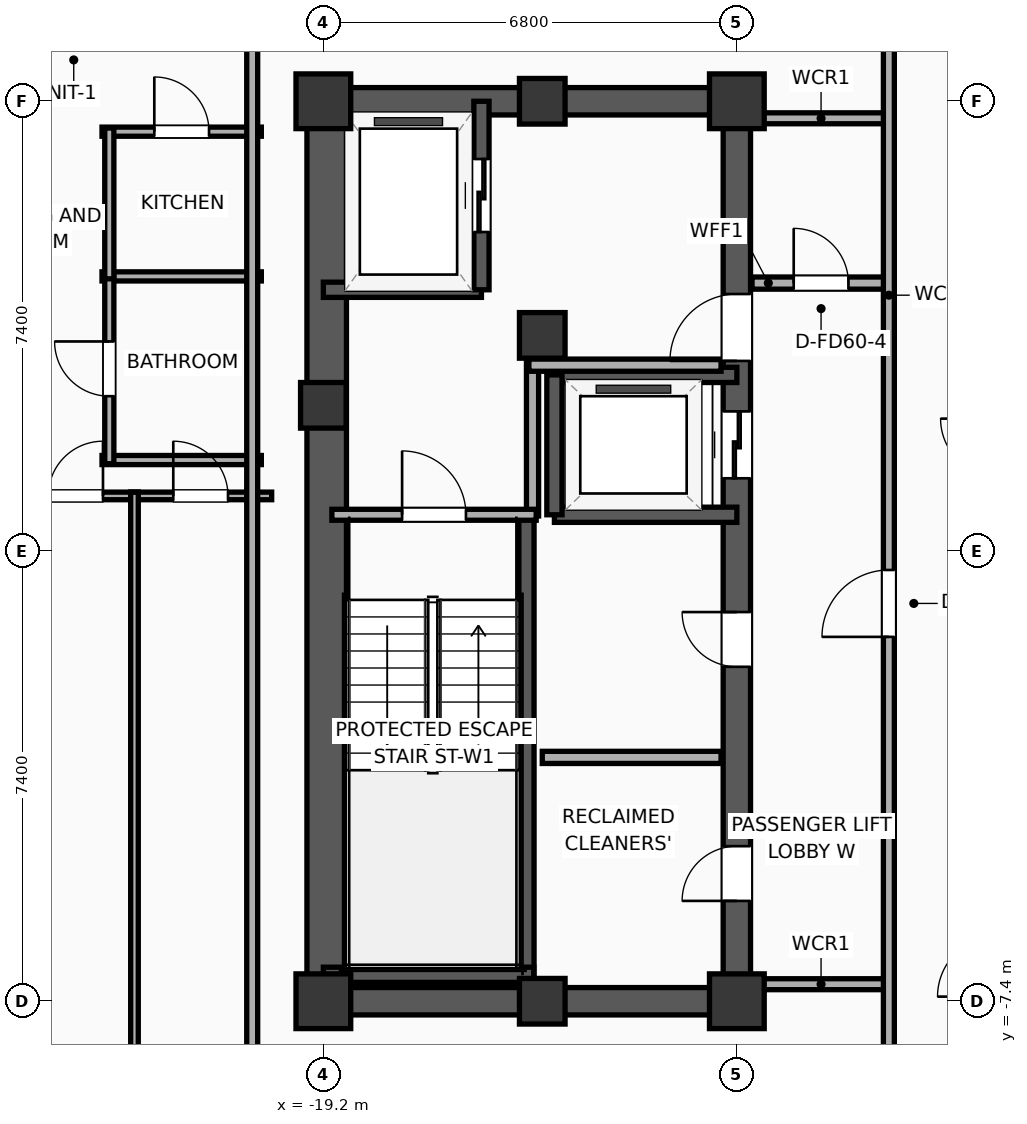
"""IFC4 building model, lengths in metres.
Left out: names, types, materials, properties, quantities, classifications, styles, units other than length and angle.
Written with IfcOpenShell. Run it as: python <this file> out.ifc"""

import sys

from ifc_helpers import new_model, si_unit, direction, frame, frame_2d, origin, origin_2d, place, context, subcontext, project, spatial, rectangle, extrude, element, fill, save


model = new_model("IFC4")
c1 = context("Model", 3, precision=1e-05, world=origin(), true_north=direction((0.0, 1.0)))
c2 = subcontext(c1, "Body", "Model", "MODEL_VIEW")
j1 = project(units=[si_unit("LENGTHUNIT", "METRE"), si_unit("PLANEANGLEUNIT", "RADIAN")], contexts=[c1])
p1 = place(None, origin())
s1 = spatial("IfcSite", under=j1, at=p1, CompositionType="ELEMENT")
p2 = place(p1, origin())
s2 = spatial("IfcBuilding", under=s1, at=p2, CompositionType="ELEMENT")
p3 = place(p2, frame((0.0, 0.0, 235.3)))
s3 = spatial("IfcBuildingStorey", under=s2, at=p3, CompositionType="ELEMENT", Elevation=235.3)
p4 = place(p3, frame((-19.2, -7.4, 0.0), z_axis=(0.0, 0.0, 1.0), x_axis=(1.0, 0.0, 0.0)))
e1 = element("IfcColumn", 1, at=p4, inside=s3, PredefinedType="COLUMN", context=c2, shape_type="SweptSolid", body=[
    extrude(rectangle(XDim=0.9, YDim=0.9, at=origin_2d()), origin(), (0.0, 0.0, 1.0), 3.9),
])
p5 = place(p3, frame((-19.2, 2.4, 0.0), z_axis=(0.0, 0.0, 1.0), x_axis=(1.0, 0.0, 0.0)))
e2 = element("IfcColumn", 2, at=p5, inside=s3, PredefinedType="COLUMN", context=c2, shape_type="SweptSolid", body=[
    extrude(rectangle(XDim=0.75, YDim=0.75, at=origin_2d()), origin(), (0.0, 0.0, 1.0), 3.9),
])
p6 = place(p3, frame((-19.2, 7.4, 0.0), z_axis=(0.0, 0.0, 1.0), x_axis=(1.0, 0.0, 0.0)))
e3 = element("IfcColumn", 3, at=p6, inside=s3, PredefinedType="COLUMN", context=c2, shape_type="SweptSolid", body=[
    extrude(rectangle(XDim=0.9, YDim=0.9, at=origin_2d()), origin(), (0.0, 0.0, 1.0), 3.9),
])
for number, where, z_axis, x_axis in (
    (4, (-15.6, -7.4, 0.0), (0.0, 0.0, 1.0), (1.0, 0.0, 0.0)),
    (5, (-15.6, 7.4, 0.0), (0.0, 0.0, 1.0), (1.0, 0.0, 0.0)),
):
    element("IfcColumn", number, at=place(p3, frame(where, z_axis=z_axis, x_axis=x_axis)), inside=s3, PredefinedType="COLUMN", context=c2, shape_type="SweptSolid", body=[
        extrude(rectangle(XDim=0.75, YDim=0.75, at=origin_2d()), origin(), (0.0, 0.0, 1.0), 3.9),
    ])
p7 = place(p3, frame((-12.4, -7.4, 0.0), z_axis=(0.0, 0.0, 1.0), x_axis=(1.0, 0.0, 0.0)))
e6 = element("IfcColumn", 6, at=p7, inside=s3, PredefinedType="COLUMN", context=c2, shape_type="SweptSolid", body=[
    extrude(rectangle(XDim=0.9, YDim=0.9, at=origin_2d()), origin(), (0.0, 0.0, 1.0), 3.9),
])
p8 = place(p3, frame((-15.6, 3.55, 0.0), z_axis=(0.0, 0.0, 1.0), x_axis=(1.0, 0.0, 0.0)))
e7 = element("IfcColumn", 7, at=p8, inside=s3, PredefinedType="COLUMN", context=c2, shape_type="SweptSolid", body=[
    extrude(rectangle(XDim=0.75, YDim=0.75, at=origin_2d()), origin(), (0.0, 0.0, 1.0), 3.9),
])
p9 = place(p3, frame((-12.4, 7.4, 0.0), z_axis=(0.0, 0.0, 1.0), x_axis=(1.0, 0.0, 0.0)))
e8 = element("IfcColumn", 8, at=p9, inside=s3, PredefinedType="COLUMN", context=c2, shape_type="SweptSolid", body=[
    extrude(rectangle(XDim=0.9, YDim=0.9, at=origin_2d()), origin(), (0.0, 0.0, 1.0), 3.9),
])
for number, where, z_axis, x_axis in (
    (9, (-19.425, -7.4, 0.0), (0.0, 0.0, 1.0), (1.0, 0.0, 0.0)),
    (10, (-19.425, 7.4, 0.0), (0.0, 0.0, 1.0), (1.0, 0.0, 0.0)),
):
    element("IfcWall", number, at=place(p3, frame(where, z_axis=z_axis, x_axis=x_axis)), inside=s3, PredefinedType="SHEAR", context=c2, shape_type="SweptSolid", body=[
        extrude(rectangle(XDim=7.25, YDim=0.45, at=frame_2d((3.625, 0.0))), origin(), (0.0, 0.0, 1.0), 3.65),
    ])
p10 = place(p3, frame((-19.145, -7.4, 0.0), z_axis=(0.0, 0.0, 1.0), x_axis=(0.0, 1.0, 0.0)))
e11 = element("IfcWall", 11, at=p10, inside=s3, PredefinedType="SHEAR", context=c2, shape_type="SweptSolid", body=[
    extrude(rectangle(XDim=14.8, YDim=0.65, at=frame_2d((7.4, 0.0))), origin(), (0.0, 0.0, 1.0), 3.65),
])
p11 = place(p3, frame((-12.4, -7.4, 0.0), z_axis=(0.0, 0.0, 1.0), x_axis=(0.0, 1.0, 0.0)))
e12 = element("IfcWall", 12, at=p11, inside=s3, PredefinedType="SHEAR", context=c2, shape_type="SweptSolid", body=[
    extrude(rectangle(XDim=14.8, YDim=0.45, at=frame_2d((7.4, 0.0))), origin(), (0.0, 0.0, 1.0), 3.65),
])
p12 = place(p11, frame((8.6, 0.0, 0.0)))
e13 = element("IfcOpeningElement", 13, at=p12, cuts=e12, PredefinedType="OPENING", context=c2, shape_type="SweptSolid", body=[
    extrude(rectangle(XDim=1.1, YDim=2.05, at=frame_2d((0.55, 1.025))), frame((0.0, 0.235, 0.0), z_axis=(0.0, -1.0, 0.0), x_axis=(1.0, 0.0, 0.0)), (0.0, 0.0, 1.0), 0.47),
])
p13 = place(p11, frame((10.53, 0.0, 0.0)))
e14 = element("IfcOpeningElement", 14, at=p13, cuts=e12, PredefinedType="OPENING", context=c2, shape_type="SweptSolid", body=[
    extrude(rectangle(XDim=1.1, YDim=2.05, at=frame_2d((0.55, 1.025))), frame((0.0, 0.235, 0.0), z_axis=(0.0, -1.0, 0.0), x_axis=(1.0, 0.0, 0.0)), (0.0, 0.0, 1.0), 0.47),
])
p14 = place(p11, frame((1.65, 0.0, 0.0)))
e15 = element("IfcOpeningElement", 15, at=p14, cuts=e12, PredefinedType="OPENING", context=c2, shape_type="SweptSolid", body=[
    extrude(rectangle(XDim=0.9, YDim=2.05, at=frame_2d((0.45, 1.025))), frame((0.0, 0.235, 0.0), z_axis=(0.0, -1.0, 0.0), x_axis=(1.0, 0.0, 0.0)), (0.0, 0.0, 1.0), 0.47),
])
p15 = place(p11, frame((5.5, 0.0, 0.0)))
e16 = element("IfcOpeningElement", 16, at=p15, cuts=e12, PredefinedType="OPENING", context=c2, shape_type="SweptSolid", body=[
    extrude(rectangle(XDim=0.9, YDim=2.05, at=frame_2d((0.45, 1.025))), frame((0.0, 0.235, 0.0), z_axis=(0.0, -1.0, 0.0), x_axis=(1.0, 0.0, 0.0)), (0.0, 0.0, 1.0), 0.47),
])
p16 = place(p3, frame((-15.86, -7.085, 0.0), z_axis=(0.0, 0.0, 1.0), x_axis=(0.0, 1.0, 0.0)))
e17 = element("IfcWall", 17, at=p16, inside=s3, PredefinedType="SOLIDWALL", context=c2, shape_type="SweptSolid", body=[
    extrude(rectangle(XDim=7.685, YDim=0.25, at=frame_2d((3.843, 0.0))), origin(), (0.0, 0.0, 1.0), 3.65),
])
p17 = place(p3, frame((-19.2, -6.965, 0.0), z_axis=(0.0, 0.0, 1.0), x_axis=(1.0, 0.0, 0.0)))
e18 = element("IfcWall", 18, at=p17, inside=s3, PredefinedType="SOLIDWALL", context=c2, shape_type="SweptSolid", body=[
    extrude(rectangle(XDim=3.46, YDim=0.25, at=frame_2d((1.73, 0.0))), origin(), (0.0, 0.0, 1.0), 3.65),
])
p18 = place(p3, frame((-19.2, 4.3, 0.0), z_axis=(0.0, 0.0, 1.0), x_axis=(1.0, 0.0, 0.0)))
e19 = element("IfcWall", 19, at=p18, inside=s3, PredefinedType="SOLIDWALL", context=c2, shape_type="SweptSolid", body=[
    extrude(rectangle(XDim=2.6, YDim=0.25, at=frame_2d((1.3, 0.0))), origin(), (0.0, 0.0, 1.0), 3.65),
])
p19 = place(p3, frame((-16.6, 4.3, 0.0), z_axis=(0.0, 0.0, 1.0), x_axis=(0.0, 1.0, 0.0)))
e20 = element("IfcWall", 20, at=p19, inside=s3, PredefinedType="SOLIDWALL", context=c2, shape_type="SweptSolid", body=[
    extrude(rectangle(XDim=3.1, YDim=0.25, at=frame_2d((1.55, 0.0))), origin(), (0.0, 0.0, 1.0), 3.65),
])
p20 = place(p19, frame((0.95, 0.0, 0.0)))
e21 = element("IfcOpeningElement", 21, at=p20, cuts=e20, PredefinedType="OPENING", context=c2, shape_type="SweptSolid", body=[
    extrude(rectangle(XDim=1.2, YDim=2.05, at=frame_2d((0.6, 1.025))), frame((0.0, 0.135, 0.0), z_axis=(0.0, -1.0, 0.0), x_axis=(1.0, 0.0, 0.0)), (0.0, 0.0, 1.0), 0.27),
])
for number, where, z_axis, x_axis in (
    (22, (-15.4, 0.6, 0.0), (0.0, 0.0, 1.0), (1.0, 0.0, 0.0)),
    (23, (-12.4, 2.9, 0.0), (0.0, 0.0, 1.0), (-1.0, 0.0, 0.0)),
):
    element("IfcWall", number, at=place(p3, frame(where, z_axis=z_axis, x_axis=x_axis)), inside=s3, PredefinedType="SOLIDWALL", context=c2, shape_type="SweptSolid", body=[
        extrude(rectangle(XDim=3.0, YDim=0.25, at=frame_2d((1.5, 0.0))), origin(), (0.0, 0.0, 1.0), 3.65),
    ])
p21 = place(p3, frame((-15.4, 2.9, 0.0), z_axis=(0.0, 0.0, 1.0), x_axis=(0.0, -1.0, 0.0)))
e24 = element("IfcWall", 24, at=p21, inside=s3, PredefinedType="SOLIDWALL", context=c2, shape_type="SweptSolid", body=[
    extrude(rectangle(XDim=2.3, YDim=0.25, at=frame_2d((1.15, 0.0))), origin(), (0.0, 0.0, 1.0), 3.65),
])
p22 = place(p3, frame((-15.76, 0.58, 0.0), z_axis=(0.0, 0.0, 1.0), x_axis=(0.0, 1.0, 0.0)))
e25 = element("IfcWall", 25, at=p22, inside=s3, PredefinedType="PARTITIONING", context=c2, shape_type="SweptSolid", body=[
    extrude(rectangle(XDim=2.52, YDim=0.2, at=frame_2d((1.26, 0.0))), origin(), (0.0, 0.0, 1.0), 3.65),
])
p23 = place(p3, frame((-15.82, 3.06, 0.0), z_axis=(0.0, 0.0, 1.0), x_axis=(1.0, 0.0, 0.0)))
e26 = element("IfcWall", 26, at=p23, inside=s3, PredefinedType="PARTITIONING", context=c2, shape_type="SweptSolid", body=[
    extrude(rectangle(XDim=3.16, YDim=0.2, at=frame_2d((1.58, 0.0))), origin(), (0.0, 0.0, 1.0), 3.65),
])
p24 = place(p3, frame((-19.06, 0.6, 0.0), z_axis=(0.0, 0.0, 1.0), x_axis=(1.0, 0.0, 0.0)))
e27 = element("IfcWall", 27, at=p24, inside=s3, PredefinedType="PARTITIONING", context=c2, shape_type="SweptSolid", body=[
    extrude(rectangle(XDim=3.36, YDim=0.18, at=frame_2d((1.68, 0.0))), origin(), (0.0, 0.0, 1.0), 3.65),
])
p25 = place(p24, frame((1.155, 0.0, 0.0)))
e28 = element("IfcOpeningElement", 28, at=p25, cuts=e27, PredefinedType="OPENING", context=c2, shape_type="SweptSolid", body=[
    extrude(rectangle(XDim=1.05, YDim=2.05, at=frame_2d((0.525, 1.025))), frame((0.0, 0.1, 0.0), z_axis=(0.0, -1.0, 0.0), x_axis=(1.0, 0.0, 0.0)), (0.0, 0.0, 1.0), 0.2),
])
p26 = place(p3, frame((-15.6, -3.39, 0.0), z_axis=(0.0, 0.0, 1.0), x_axis=(1.0, 0.0, 0.0)))
e29 = element("IfcWall", 29, at=p26, inside=s3, PredefinedType="PARTITIONING", context=c2, shape_type="SweptSolid", body=[
    extrude(rectangle(XDim=2.94, YDim=0.2, at=frame_2d((1.47, 0.0))), origin(), (0.0, 0.0, 1.0), 3.65),
])
p27 = place(p3, frame((-12.15, 4.41, 0.0), z_axis=(0.0, 0.0, 1.0), x_axis=(1.0, 0.0, 0.0)))
e30 = element("IfcWall", 30, at=p27, inside=s3, PredefinedType="PARTITIONING", context=c2, shape_type="SweptSolid", body=[
    extrude(rectangle(XDim=2.27, YDim=0.2, at=frame_2d((1.135, 0.0))), origin(), (0.0, 0.0, 1.0), 3.65),
])
p28 = place(p27, frame((0.685, 0.0, 0.0)))
e31 = element("IfcOpeningElement", 31, at=p28, cuts=e30, PredefinedType="OPENING", context=c2, shape_type="SweptSolid", body=[
    extrude(rectangle(XDim=0.9, YDim=2.05, at=frame_2d((0.45, 1.025))), frame((0.0, 0.11, 0.0), z_axis=(0.0, -1.0, 0.0), x_axis=(1.0, 0.0, 0.0)), (0.0, 0.0, 1.0), 0.22),
])
for number, where, z_axis, x_axis in (
    (32, (-12.15, 7.12, 0.0), (0.0, 0.0, 1.0), (1.0, 0.0, 0.0)),
    (33, (-12.15, -7.12, 0.0), (0.0, 0.0, 1.0), (1.0, 0.0, 0.0)),
):
    element("IfcWall", number, at=place(p3, frame(where, z_axis=z_axis, x_axis=x_axis)), inside=s3, PredefinedType="PARTITIONING", context=c2, shape_type="SweptSolid", body=[
        extrude(rectangle(XDim=2.27, YDim=0.18, at=frame_2d((1.135, 0.0))), origin(), (0.0, 0.0, 1.0), 3.65),
    ])
p29 = place(p3, frame((-9.9, -8.58, 0.0), z_axis=(0.0, 0.0, 1.0), x_axis=(0.0, 1.0, 0.0)))
e34 = element("IfcWall", 34, at=p29, inside=s3, PredefinedType="PARTITIONING", context=c2, shape_type="SweptSolid", body=[
    extrude(rectangle(XDim=17.16, YDim=0.18, at=frame_2d((8.58, 0.0))), origin(), (0.0, 0.0, 1.0), 3.65),
])
p30 = place(p29, frame((7.172, 0.0, 0.0)))
e35 = element("IfcOpeningElement", 35, at=p30, cuts=e34, PredefinedType="OPENING", context=c2, shape_type="SweptSolid", body=[
    extrude(rectangle(XDim=1.1, YDim=2.05, at=frame_2d((0.55, 1.025))), frame((0.0, 0.1, 0.0), z_axis=(0.0, -1.0, 0.0), x_axis=(1.0, 0.0, 0.0)), (0.0, 0.0, 1.0), 0.2),
])
p31 = place(p3, frame((-22.84, 6.9, 0.0), z_axis=(0.0, 0.0, 1.0), x_axis=(1.0, 0.0, 0.0)))
e36 = element("IfcWall", 36, at=p31, inside=s3, PredefinedType="PLUMBINGWALL", context=c2, shape_type="SweptSolid", body=[
    extrude(rectangle(XDim=2.62, YDim=0.15, at=frame_2d((1.31, 0.0))), origin(), (0.0, 0.0, 1.0), 3.65),
])
p32 = place(p31, frame((0.86, 0.0, 0.0)))
e37 = element("IfcOpeningElement", 37, at=p32, cuts=e36, PredefinedType="OPENING", context=c2, shape_type="SweptSolid", body=[
    extrude(rectangle(XDim=0.9, YDim=2.05, at=frame_2d((0.45, 1.025))), frame((0.0, 0.085, 0.0), z_axis=(0.0, -1.0, 0.0), x_axis=(1.0, 0.0, 0.0)), (0.0, 0.0, 1.0), 0.17),
])
for number, where, z_axis, x_axis in (
    (38, (-22.84, 4.52, 0.0), (0.0, 0.0, 1.0), (1.0, 0.0, 0.0)),
    (39, (-22.84, 1.5, 0.0), (0.0, 0.0, 1.0), (1.0, 0.0, 0.0)),
):
    element("IfcWall", number, at=place(p3, frame(where, z_axis=z_axis, x_axis=x_axis)), inside=s3, PredefinedType="PLUMBINGWALL", context=c2, shape_type="SweptSolid", body=[
        extrude(rectangle(XDim=2.62, YDim=0.15, at=frame_2d((1.31, 0.0))), origin(), (0.0, 0.0, 1.0), 3.65),
    ])
p33 = place(p3, frame((-22.72, 1.44, 0.0), z_axis=(0.0, 0.0, 1.0), x_axis=(0.0, 1.0, 0.0)))
e40 = element("IfcWall", 40, at=p33, inside=s3, PredefinedType="PLUMBINGWALL", context=c2, shape_type="SweptSolid", body=[
    extrude(rectangle(XDim=3.12, YDim=0.15, at=frame_2d((1.56, 0.0))), origin(), (0.0, 0.0, 1.0), 3.65),
])
p34 = place(p33, frame((1.11, 0.0, 0.0)))
e41 = element("IfcOpeningElement", 41, at=p34, cuts=e40, PredefinedType="OPENING", context=c2, shape_type="SweptSolid", body=[
    extrude(rectangle(XDim=0.9, YDim=2.05, at=frame_2d((0.45, 1.025))), frame((0.0, 0.085, 0.0), z_axis=(0.0, -1.0, 0.0), x_axis=(1.0, 0.0, 0.0)), (0.0, 0.0, 1.0), 0.17),
])
p35 = place(p3, frame((-22.72, 4.48, 0.0), z_axis=(0.0, 0.0, 1.0), x_axis=(0.0, 1.0, 0.0)))
e42 = element("IfcWall", 42, at=p35, inside=s3, PredefinedType="PLUMBINGWALL", context=c2, shape_type="SweptSolid", body=[
    extrude(rectangle(XDim=2.48, YDim=0.15, at=frame_2d((1.24, 0.0))), origin(), (0.0, 0.0, 1.0), 3.65),
])
p36 = place(p3, frame((-24.304, 0.91, 0.0), z_axis=(0.0, 0.0, 1.0), x_axis=(1.0, 0.0, 0.0)))
e43 = element("IfcWall", 43, at=p36, inside=s3, PredefinedType="PARTITIONING", context=c2, shape_type="SweptSolid", body=[
    extrude(rectangle(XDim=2.061, YDim=0.125, at=frame_2d((1.031, 0.0))), origin(), (0.0, 0.0, 1.0), 3.65),
])
p37 = place(p36, frame((0.581, 0.0, 0.0)))
e44 = element("IfcOpeningElement", 44, at=p37, cuts=e43, PredefinedType="OPENING", context=c2, shape_type="SweptSolid", body=[
    extrude(rectangle(XDim=0.9, YDim=2.05, at=frame_2d((0.45, 1.025))), frame((0.0, 0.073, 0.0), z_axis=(0.0, -1.0, 0.0), x_axis=(1.0, 0.0, 0.0)), (0.0, 0.0, 1.0), 0.145),
])
p38 = place(p3, frame((-22.368, 0.91, 0.0), z_axis=(0.0, 0.0, 1.0), x_axis=(1.0, 0.0, 0.0)))
e45 = element("IfcWall", 45, at=p38, inside=s3, PredefinedType="PARTITIONING", context=c2, shape_type="SweptSolid", body=[
    extrude(rectangle(XDim=2.318, YDim=0.125, at=frame_2d((1.159, 0.0))), origin(), (0.0, 0.0, 1.0), 3.65),
])
p39 = place(p38, frame((0.7, 0.0, 0.0)))
e46 = element("IfcOpeningElement", 46, at=p39, cuts=e45, PredefinedType="OPENING", context=c2, shape_type="SweptSolid", body=[
    extrude(rectangle(XDim=0.9, YDim=2.05, at=frame_2d((0.45, 1.025))), frame((0.0, 0.073, 0.0), z_axis=(0.0, -1.0, 0.0), x_axis=(1.0, 0.0, 0.0)), (0.0, 0.0, 1.0), 0.145),
])
p40 = place(p3, frame((-22.306, -8.81, 0.0), z_axis=(0.0, 0.0, 1.0), x_axis=(0.0, 1.0, 0.0)))
e47 = element("IfcWall", 47, at=p40, inside=s3, PredefinedType="PARTITIONING", context=c2, shape_type="SweptSolid", body=[
    extrude(rectangle(XDim=9.78, YDim=0.125, at=frame_2d((4.89, 0.0))), origin(), (0.0, 0.0, 1.0), 3.65),
])
p41 = place(p3, frame((-20.37, -8.61, 0.0), z_axis=(0.0, 0.0, 1.0), x_axis=(0.0, 1.0, 0.0)))
e48 = element("IfcWall", 48, at=p41, inside=s3, PredefinedType="PARTITIONING", context=c2, shape_type="SweptSolid", body=[
    extrude(rectangle(XDim=17.22, YDim=0.18, at=frame_2d((8.61, 0.0))), origin(), (0.0, 0.0, 1.0), 3.65),
])
p42 = place(p20, origin())
e49 = element("IfcDoor", 49, at=p42, inside=s3, OperationType="SLIDING_TO_LEFT", PredefinedType="DOOR", context=c2, shape_type="SweptSolid", body=[
    extrude(rectangle(XDim=1.2, YDim=2.05, at=frame_2d((0.6, 1.025))), frame((0.0, 0.025, 0.0), z_axis=(0.0, -1.0, 0.0), x_axis=(1.0, 0.0, 0.0)), (0.0, 0.0, 1.0), 0.05),
])
fill(e21, e49)
p43 = place(p12, origin())
e50 = element("IfcDoor", 50, at=p43, inside=s3, OperationType="SLIDING_TO_LEFT", PredefinedType="DOOR", context=c2, shape_type="SweptSolid", body=[
    extrude(rectangle(XDim=1.1, YDim=2.05, at=frame_2d((0.55, 1.025))), frame((0.0, 0.025, 0.0), z_axis=(0.0, -1.0, 0.0), x_axis=(1.0, 0.0, 0.0)), (0.0, 0.0, 1.0), 0.05),
])
fill(e13, e50)
p44 = place(p25, origin())
e51 = element("IfcDoor", 51, at=p44, inside=s3, OperationType="SINGLE_SWING_LEFT", PredefinedType="DOOR", context=c2, shape_type="SweptSolid", body=[
    extrude(rectangle(XDim=1.05, YDim=2.05, at=frame_2d((0.525, 1.025))), frame((0.0, 0.025, 0.0), z_axis=(0.0, -1.0, 0.0), x_axis=(1.0, 0.0, 0.0)), (0.0, 0.0, 1.0), 0.05),
])
fill(e28, e51)
p45 = place(p28, origin())
e52 = element("IfcDoor", 52, at=p45, inside=s3, OperationType="SINGLE_SWING_LEFT", PredefinedType="DOOR", context=c2, shape_type="SweptSolid", body=[
    extrude(rectangle(XDim=0.9, YDim=2.05, at=frame_2d((0.45, 1.025))), frame((0.0, 0.025, 0.0), z_axis=(0.0, -1.0, 0.0), x_axis=(1.0, 0.0, 0.0)), (0.0, 0.0, 1.0), 0.05),
])
fill(e31, e52)
p46 = place(p30, origin())
e53 = element("IfcDoor", 53, at=p46, inside=s3, OperationType="SINGLE_SWING_LEFT", PredefinedType="DOOR", context=c2, shape_type="SweptSolid", body=[
    extrude(rectangle(XDim=1.1, YDim=2.05, at=frame_2d((0.55, 1.025))), frame((0.0, 0.025, 0.0), z_axis=(0.0, -1.0, 0.0), x_axis=(1.0, 0.0, 0.0)), (0.0, 0.0, 1.0), 0.05),
])
fill(e35, e53)
p47 = place(p32, origin())
e54 = element("IfcDoor", 54, at=p47, inside=s3, OperationType="SINGLE_SWING_LEFT", PredefinedType="DOOR", context=c2, shape_type="SweptSolid", body=[
    extrude(rectangle(XDim=0.9, YDim=2.05, at=frame_2d((0.45, 1.025))), frame((0.0, 0.025, 0.0), z_axis=(0.0, -1.0, 0.0), x_axis=(1.0, 0.0, 0.0)), (0.0, 0.0, 1.0), 0.05),
])
fill(e37, e54)
p48 = place(p34, origin())
e55 = element("IfcDoor", 55, at=p48, inside=s3, OperationType="SINGLE_SWING_RIGHT", PredefinedType="DOOR", context=c2, shape_type="SweptSolid", body=[
    extrude(rectangle(XDim=0.9, YDim=2.05, at=frame_2d((0.45, 1.025))), frame((0.0, 0.025, 0.0), z_axis=(0.0, -1.0, 0.0), x_axis=(1.0, 0.0, 0.0)), (0.0, 0.0, 1.0), 0.05),
])
fill(e41, e55)
p49 = place(p37, origin())
e56 = element("IfcDoor", 56, at=p49, inside=s3, OperationType="SINGLE_SWING_RIGHT", PredefinedType="DOOR", context=c2, shape_type="SweptSolid", body=[
    extrude(rectangle(XDim=0.9, YDim=2.05, at=frame_2d((0.45, 1.025))), frame((0.0, 0.025, 0.0), z_axis=(0.0, -1.0, 0.0), x_axis=(1.0, 0.0, 0.0)), (0.0, 0.0, 1.0), 0.05),
])
fill(e44, e56)
p50 = place(p39, origin())
e57 = element("IfcDoor", 57, at=p50, inside=s3, OperationType="SINGLE_SWING_LEFT", PredefinedType="DOOR", context=c2, shape_type="SweptSolid", body=[
    extrude(rectangle(XDim=0.9, YDim=2.05, at=frame_2d((0.45, 1.025))), frame((0.0, 0.025, 0.0), z_axis=(0.0, -1.0, 0.0), x_axis=(1.0, 0.0, 0.0)), (0.0, 0.0, 1.0), 0.05),
])
fill(e46, e57)
p51 = place(p13, origin())
e58 = element("IfcDoor", 58, at=p51, inside=s3, OperationType="SINGLE_SWING_LEFT", PredefinedType="DOOR", context=c2, shape_type="SweptSolid", body=[
    extrude(rectangle(XDim=1.1, YDim=2.05, at=frame_2d((0.55, 1.025))), frame((0.0, 0.025, 0.0), z_axis=(0.0, -1.0, 0.0), x_axis=(1.0, 0.0, 0.0)), (0.0, 0.0, 1.0), 0.05),
])
fill(e14, e58)
p52 = place(p14, origin())
e59 = element("IfcDoor", 59, at=p52, inside=s3, OperationType="SINGLE_SWING_LEFT", PredefinedType="DOOR", context=c2, shape_type="SweptSolid", body=[
    extrude(rectangle(XDim=0.9, YDim=2.05, at=frame_2d((0.45, 1.025))), frame((0.0, 0.025, 0.0), z_axis=(0.0, -1.0, 0.0), x_axis=(1.0, 0.0, 0.0)), (0.0, 0.0, 1.0), 0.05),
])
fill(e15, e59)
p53 = place(p15, origin())
e60 = element("IfcDoor", 60, at=p53, inside=s3, OperationType="SINGLE_SWING_RIGHT", PredefinedType="DOOR", context=c2, shape_type="SweptSolid", body=[
    extrude(rectangle(XDim=0.9, YDim=2.05, at=frame_2d((0.45, 1.025))), frame((0.0, 0.025, 0.0), z_axis=(0.0, -1.0, 0.0), x_axis=(1.0, 0.0, 0.0)), (0.0, 0.0, 1.0), 0.05),
])
fill(e16, e60)
save(model, sys.argv[1])
